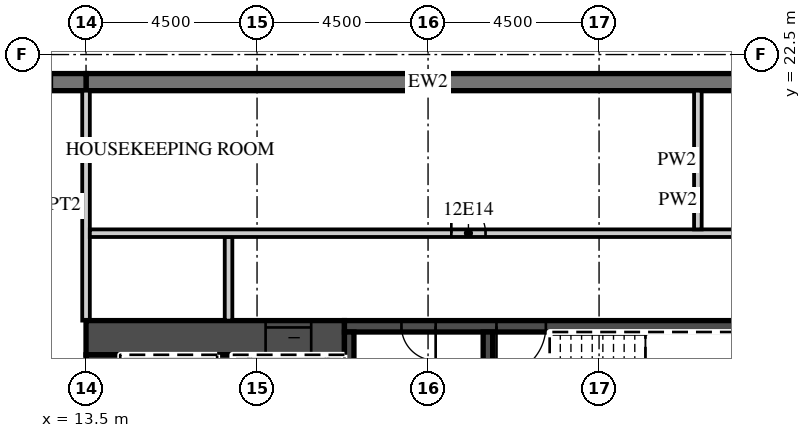
"""IFC4 building model, lengths in metres.
Left out: names, types, materials, properties, quantities, classifications, styles, units other than length and angle.
Written with IfcOpenShell. Run it as: python <this file> out.ifc"""

import sys

from ifc_helpers import new_model, si_unit, direction, frame, frame_2d, origin, place, context, subcontext, project, spatial, rectangle, extrude, element, fill, save


model = new_model("IFC4")
c1 = context("Model", 3, precision=1e-05, world=origin(), true_north=direction((0.0, 1.0)))
c2 = subcontext(c1, "Body", "Model", "MODEL_VIEW")
j1 = project(units=[si_unit("LENGTHUNIT", "METRE"), si_unit("PLANEANGLEUNIT", "RADIAN")], contexts=[c1])
p1 = place(None, origin())
s1 = spatial("IfcSite", under=j1, at=p1, CompositionType="ELEMENT")
p2 = place(p1, origin())
s2 = spatial("IfcBuilding", under=s1, at=p2, CompositionType="ELEMENT")
p3 = place(p2, frame((0.0, 0.0, 69.9)))
s3 = spatial("IfcBuildingStorey", under=s2, at=p3, CompositionType="ELEMENT", Elevation=69.9)
p4 = place(p3, frame((31.5, 21.775, 0.0), z_axis=(0.0, 0.0, 1.0), x_axis=(-1.0, 0.0, 0.0)))
e1 = element("IfcWall", 1, at=p4, inside=s3, PredefinedType="SOLIDWALL", context=c2, shape_type="SweptSolid", body=[
    extrude(rectangle(XDim=18.0, YDim=0.45, at=frame_2d((9.0, 0.0))), origin(), (0.0, 0.0, 1.0), 3.02),
])
p5 = place(p3, frame((13.5, 21.775, 0.0), z_axis=(0.0, 0.0, 1.0), x_axis=(-1.0, 0.0, 0.0)))
e2 = element("IfcWall", 2, at=p5, inside=s3, PredefinedType="SOLIDWALL", context=c2, shape_type="SweptSolid", body=[
    extrude(rectangle(XDim=54.5, YDim=0.45, at=frame_2d((27.25, 0.0))), origin(), (0.0, 0.0, 1.0), 3.02),
])
p6 = place(p5, frame((0.9, 0.0, 0.45)))
e3 = element("IfcOpeningElement", 3, at=p6, cuts=e2, PredefinedType="OPENING", context=c2, shape_type="SweptSolid", body=[
    extrude(rectangle(XDim=2.7, YDim=2.25, at=frame_2d((1.35, 1.125))), frame((0.0, 0.235, 0.0), z_axis=(0.0, -1.0, 0.0), x_axis=(1.0, 0.0, 0.0)), (0.0, 0.0, 1.0), 0.47),
])
p7 = place(p5, frame((5.4, 0.0, 0.45)))
e4 = element("IfcOpeningElement", 4, at=p7, cuts=e2, PredefinedType="OPENING", context=c2, shape_type="SweptSolid", body=[
    extrude(rectangle(XDim=2.7, YDim=2.25, at=frame_2d((1.35, 1.125))), frame((0.0, 0.235, 0.0), z_axis=(0.0, -1.0, 0.0), x_axis=(1.0, 0.0, 0.0)), (0.0, 0.0, 1.0), 0.47),
])
p8 = place(p5, frame((9.9, 0.0, 0.45)))
e5 = element("IfcOpeningElement", 5, at=p8, cuts=e2, PredefinedType="OPENING", context=c2, shape_type="SweptSolid", body=[
    extrude(rectangle(XDim=2.7, YDim=2.25, at=frame_2d((1.35, 1.125))), frame((0.0, 0.235, 0.0), z_axis=(0.0, -1.0, 0.0), x_axis=(1.0, 0.0, 0.0)), (0.0, 0.0, 1.0), 0.47),
])
p9 = place(p5, frame((14.4, 0.0, 0.45)))
e6 = element("IfcOpeningElement", 6, at=p9, cuts=e2, PredefinedType="OPENING", context=c2, shape_type="SweptSolid", body=[
    extrude(rectangle(XDim=2.7, YDim=2.25, at=frame_2d((1.35, 1.125))), frame((0.0, 0.235, 0.0), z_axis=(0.0, -1.0, 0.0), x_axis=(1.0, 0.0, 0.0)), (0.0, 0.0, 1.0), 0.47),
])
p10 = place(p5, frame((18.9, 0.0, 0.45)))
e7 = element("IfcOpeningElement", 7, at=p10, cuts=e2, PredefinedType="OPENING", context=c2, shape_type="SweptSolid", body=[
    extrude(rectangle(XDim=2.7, YDim=2.25, at=frame_2d((1.35, 1.125))), frame((0.0, 0.235, 0.0), z_axis=(0.0, -1.0, 0.0), x_axis=(1.0, 0.0, 0.0)), (0.0, 0.0, 1.0), 0.47),
])
p11 = place(p5, frame((23.4, 0.0, 0.45)))
e8 = element("IfcOpeningElement", 8, at=p11, cuts=e2, PredefinedType="OPENING", context=c2, shape_type="SweptSolid", body=[
    extrude(rectangle(XDim=2.7, YDim=2.25, at=frame_2d((1.35, 1.125))), frame((0.0, 0.235, 0.0), z_axis=(0.0, -1.0, 0.0), x_axis=(1.0, 0.0, 0.0)), (0.0, 0.0, 1.0), 0.47),
])
p12 = place(p5, frame((27.9, 0.0, 0.45)))
e9 = element("IfcOpeningElement", 9, at=p12, cuts=e2, PredefinedType="OPENING", context=c2, shape_type="SweptSolid", body=[
    extrude(rectangle(XDim=2.7, YDim=2.25, at=frame_2d((1.35, 1.125))), frame((0.0, 0.235, 0.0), z_axis=(0.0, -1.0, 0.0), x_axis=(1.0, 0.0, 0.0)), (0.0, 0.0, 1.0), 0.47),
])
p13 = place(p5, frame((32.4, 0.0, 0.45)))
e10 = element("IfcOpeningElement", 10, at=p13, cuts=e2, PredefinedType="OPENING", context=c2, shape_type="SweptSolid", body=[
    extrude(rectangle(XDim=2.7, YDim=2.25, at=frame_2d((1.35, 1.125))), frame((0.0, 0.235, 0.0), z_axis=(0.0, -1.0, 0.0), x_axis=(1.0, 0.0, 0.0)), (0.0, 0.0, 1.0), 0.47),
])
p14 = place(p5, frame((36.9, 0.0, 0.45)))
e11 = element("IfcOpeningElement", 11, at=p14, cuts=e2, PredefinedType="OPENING", context=c2, shape_type="SweptSolid", body=[
    extrude(rectangle(XDim=2.7, YDim=2.25, at=frame_2d((1.35, 1.125))), frame((0.0, 0.235, 0.0), z_axis=(0.0, -1.0, 0.0), x_axis=(1.0, 0.0, 0.0)), (0.0, 0.0, 1.0), 0.47),
])
p15 = place(p5, frame((41.4, 0.0, 0.45)))
e12 = element("IfcOpeningElement", 12, at=p15, cuts=e2, PredefinedType="OPENING", context=c2, shape_type="SweptSolid", body=[
    extrude(rectangle(XDim=2.7, YDim=2.25, at=frame_2d((1.35, 1.125))), frame((0.0, 0.235, 0.0), z_axis=(0.0, -1.0, 0.0), x_axis=(1.0, 0.0, 0.0)), (0.0, 0.0, 1.0), 0.47),
])
p16 = place(p5, frame((45.9, 0.0, 0.45)))
e13 = element("IfcOpeningElement", 13, at=p16, cuts=e2, PredefinedType="OPENING", context=c2, shape_type="SweptSolid", body=[
    extrude(rectangle(XDim=2.7, YDim=2.25, at=frame_2d((1.35, 1.125))), frame((0.0, 0.235, 0.0), z_axis=(0.0, -1.0, 0.0), x_axis=(1.0, 0.0, 0.0)), (0.0, 0.0, 1.0), 0.47),
])
p17 = place(p5, frame((50.4, 0.0, 0.45)))
e14 = element("IfcOpeningElement", 14, at=p17, cuts=e2, PredefinedType="OPENING", context=c2, shape_type="SweptSolid", body=[
    extrude(rectangle(XDim=2.7, YDim=2.25, at=frame_2d((1.35, 1.125))), frame((0.0, 0.235, 0.0), z_axis=(0.0, -1.0, 0.0), x_axis=(1.0, 0.0, 0.0)), (0.0, 0.0, 1.0), 0.47),
])
p18 = place(p3, frame((13.5, 15.5, 0.0), z_axis=(0.0, 0.0, 1.0), x_axis=(0.0, 1.0, 0.0)))
e15 = element("IfcWall", 15, at=p18, inside=s3, PredefinedType="PARTITIONING", context=c2, shape_type="SweptSolid", body=[
    extrude(rectangle(XDim=6.05, YDim=0.2, at=frame_2d((3.025, 0.0))), origin(), (0.0, 0.0, 1.0), 3.02),
])
p19 = place(p3, frame((13.5, 15.05, 0.0), z_axis=(0.0, 0.0, 1.0), x_axis=(1.0, 0.0, 0.0)))
e16 = element("IfcWall", 16, at=p19, inside=s3, PredefinedType="SHEAR", context=c2, shape_type="SweptSolid", body=[
    extrude(rectangle(XDim=6.8, YDim=0.9, at=frame_2d((3.4, 0.0))), origin(), (0.0, 0.0, 1.0), 3.02),
])
p20 = place(p19, frame((4.725, 0.0, 0.0)))
e17 = element("IfcOpeningElement", 17, at=p20, cuts=e16, PredefinedType="OPENING", context=c2, shape_type="SweptSolid", body=[
    extrude(rectangle(XDim=1.2, YDim=2.1, at=frame_2d((0.6, 1.05))), frame((0.0, 0.46, 0.0), z_axis=(0.0, -1.0, 0.0), x_axis=(1.0, 0.0, 0.0)), (0.0, 0.0, 1.0), 0.92),
])
p21 = place(p3, frame((20.3, 15.35, 0.0), z_axis=(0.0, 0.0, 1.0), x_axis=(1.0, 0.0, 0.0)))
e18 = element("IfcWall", 18, at=p21, inside=s3, PredefinedType="SHEAR", context=c2, shape_type="SweptSolid", body=[
    extrude(rectangle(XDim=10.3, YDim=0.3, at=frame_2d((5.15, 0.0))), origin(), (0.0, 0.0, 1.0), 3.02),
])
p22 = place(p21, frame((4.0, 0.0, 0.0)))
e19 = element("IfcOpeningElement", 19, at=p22, cuts=e18, PredefinedType="OPENING", context=c2, shape_type="SweptSolid", body=[
    extrude(rectangle(XDim=1.3, YDim=2.1, at=frame_2d((0.65, 1.05))), frame((0.0, 0.16, 0.0), z_axis=(0.0, -1.0, 0.0), x_axis=(1.0, 0.0, 0.0)), (0.0, 0.0, 1.0), 0.32),
])
p23 = place(p21, frame((1.5, 0.0, 0.0)))
e20 = element("IfcOpeningElement", 20, at=p23, cuts=e18, PredefinedType="OPENING", context=c2, shape_type="SweptSolid", body=[
    extrude(rectangle(XDim=0.9, YDim=2.1, at=frame_2d((0.45, 1.05))), frame((0.0, 0.16, 0.0), z_axis=(0.0, -1.0, 0.0), x_axis=(1.0, 0.0, 0.0)), (0.0, 0.0, 1.0), 0.32),
])
p24 = place(p3, frame((13.95, 2.4, 0.0), z_axis=(0.0, 0.0, 1.0), x_axis=(0.0, 1.0, 0.0)))
e21 = element("IfcWall", 21, at=p24, inside=s3, PredefinedType="SHEAR", context=c2, shape_type="SweptSolid", body=[
    extrude(rectangle(XDim=12.2, YDim=0.9, at=frame_2d((6.1, 0.0))), origin(), (0.0, 0.0, 1.0), 3.02),
])
p25 = place(p3, frame((17.15, 8.8, 0.0), z_axis=(0.0, 0.0, 1.0), x_axis=(0.0, 1.0, 0.0)))
e22 = element("IfcWall", 22, at=p25, inside=s3, PredefinedType="SHEAR", context=c2, shape_type="SweptSolid", body=[
    extrude(rectangle(XDim=5.8, YDim=0.4, at=frame_2d((2.9, 0.0))), origin(), (0.0, 0.0, 1.0), 3.02),
])
for number, where, z_axis, x_axis in (
    (23, (20.425, 11.95, 0.0), (0.0, 0.0, 1.0), (0.0, 1.0, 0.0)),
    (24, (24.075, 11.95, 0.0), (0.0, 0.0, 1.0), (0.0, 1.0, 0.0)),
):
    element("IfcWall", number, at=place(p3, frame(where, z_axis=z_axis, x_axis=x_axis)), inside=s3, PredefinedType="SHEAR", context=c2, shape_type="SweptSolid", body=[
        extrude(rectangle(XDim=3.25, YDim=0.25, at=frame_2d((1.625, 0.0))), origin(), (0.0, 0.0, 1.0), 3.02),
    ])
p26 = place(p3, frame((17.25, 15.5, 0.0), z_axis=(0.0, 0.0, 1.0), x_axis=(0.0, 1.0, 0.0)))
e25 = element("IfcWall", 25, at=p26, inside=s3, PredefinedType="PARTITIONING", context=c2, shape_type="SweptSolid", body=[
    extrude(rectangle(XDim=2.2, YDim=0.2, at=frame_2d((1.1, 0.0))), origin(), (0.0, 0.0, 1.0), 3.02),
])
p27 = place(p3, frame((13.6, 17.8, 0.0), z_axis=(0.0, 0.0, 1.0), x_axis=(1.0, 0.0, 0.0)))
e26 = element("IfcWall", 26, at=p27, inside=s3, PredefinedType="PARTITIONING", context=c2, shape_type="SweptSolid", body=[
    extrude(rectangle(XDim=30.95, YDim=0.2, at=frame_2d((15.475, 0.0))), origin(), (0.0, 0.0, 1.0), 3.02),
])
p28 = place(p27, frame((17.812, 0.0, 0.0)))
e27 = element("IfcOpeningElement", 27, at=p28, cuts=e26, PredefinedType="OPENING", context=c2, shape_type="SweptSolid", body=[
    extrude(rectangle(XDim=0.9, YDim=2.1, at=frame_2d((0.45, 1.05))), frame((0.0, 0.11, 0.0), z_axis=(0.0, -1.0, 0.0), x_axis=(1.0, 0.0, 0.0)), (0.0, 0.0, 1.0), 0.22),
])
p29 = place(p27, frame((9.512, 0.0, 0.0)))
e28 = element("IfcOpeningElement", 28, at=p29, cuts=e26, PredefinedType="OPENING", context=c2, shape_type="SweptSolid", body=[
    extrude(rectangle(XDim=0.9, YDim=2.1, at=frame_2d((0.45, 1.05))), frame((0.0, 0.11, 0.0), z_axis=(0.0, -1.0, 0.0), x_axis=(1.0, 0.0, 0.0)), (0.0, 0.0, 1.0), 0.22),
])
p30 = place(p3, frame((29.6, 17.9, 0.0), z_axis=(0.0, 0.0, 1.0), x_axis=(0.0, 1.0, 0.0)))
e29 = element("IfcWall", 29, at=p30, inside=s3, PredefinedType="PARTITIONING", context=c2, shape_type="SweptSolid", body=[
    extrude(rectangle(XDim=3.65, YDim=0.2, at=frame_2d((1.825, 0.0))), origin(), (0.0, 0.0, 1.0), 3.02),
])
p31 = place(p20, origin())
e30 = element("IfcDoor", 30, at=p31, inside=s3, OperationType="SLIDING_TO_LEFT", PredefinedType="DOOR", context=c2, shape_type="SweptSolid", body=[
    extrude(rectangle(XDim=1.2, YDim=2.1, at=frame_2d((0.6, 1.05))), frame((0.0, 0.025, 0.0), z_axis=(0.0, -1.0, 0.0), x_axis=(1.0, 0.0, 0.0)), (0.0, 0.0, 1.0), 0.05),
])
fill(e17, e30)
p32 = place(p22, origin())
e31 = element("IfcDoor", 31, at=p32, inside=s3, OperationType="SINGLE_SWING_LEFT", PredefinedType="DOOR", context=c2, shape_type="SweptSolid", body=[
    extrude(rectangle(XDim=1.3, YDim=2.1, at=frame_2d((0.65, 1.05))), frame((0.0, 0.025, 0.0), z_axis=(0.0, -1.0, 0.0), x_axis=(1.0, 0.0, 0.0)), (0.0, 0.0, 1.0), 0.05),
])
fill(e19, e31)
p33 = place(p23, origin())
e32 = element("IfcDoor", 32, at=p33, inside=s3, OperationType="SINGLE_SWING_RIGHT", PredefinedType="DOOR", context=c2, shape_type="SweptSolid", body=[
    extrude(rectangle(XDim=0.9, YDim=2.1, at=frame_2d((0.45, 1.05))), frame((0.0, 0.025, 0.0), z_axis=(0.0, -1.0, 0.0), x_axis=(1.0, 0.0, 0.0)), (0.0, 0.0, 1.0), 0.05),
])
fill(e20, e32)
p34 = place(p29, origin())
e33 = element("IfcDoor", 33, at=p34, inside=s3, OperationType="SINGLE_SWING_LEFT", PredefinedType="DOOR", context=c2, shape_type="SweptSolid", body=[
    extrude(rectangle(XDim=0.9, YDim=2.1, at=frame_2d((0.45, 1.05))), frame((0.0, 0.025, 0.0), z_axis=(0.0, -1.0, 0.0), x_axis=(1.0, 0.0, 0.0)), (0.0, 0.0, 1.0), 0.05),
])
fill(e28, e33)
save(model, sys.argv[1])
